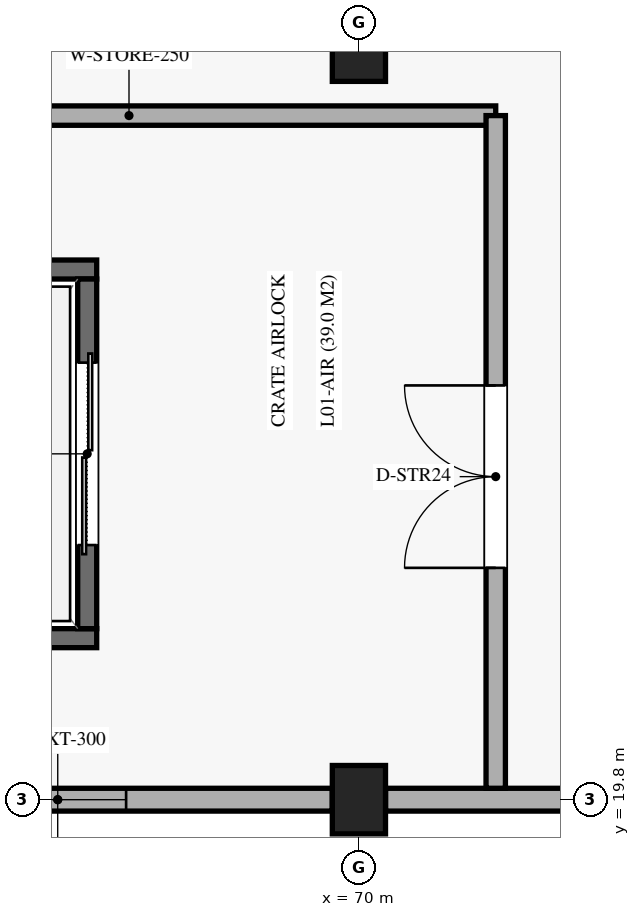
"""IFC4 building model, lengths in metres.
Left out: names, types, materials, properties, quantities, classifications, styles, units other than length and angle.
Written with IfcOpenShell. Run it as: python <this file> out.ifc"""

import sys

from ifc_helpers import new_model, si_unit, direction, frame, frame_2d, origin, origin_2d, place, context, subcontext, project, spatial, rectangle, extrude, element, fill, save


model = new_model("IFC4")
c1 = context("Model", 3, precision=1e-05, world=origin(), true_north=direction((0.0, 1.0)))
c2 = subcontext(c1, "Body", "Model", "MODEL_VIEW")
j1 = project(units=[si_unit("LENGTHUNIT", "METRE"), si_unit("PLANEANGLEUNIT", "RADIAN")], contexts=[c1])
p1 = place(None, origin())
s1 = spatial("IfcSite", under=j1, at=p1, CompositionType="ELEMENT")
p2 = place(p1, origin())
s2 = spatial("IfcBuilding", under=s1, at=p2, CompositionType="ELEMENT")
p3 = place(p2, frame((0.0, 0.0, 5.44)))
s3 = spatial("IfcBuildingStorey", under=s2, at=p3, CompositionType="ELEMENT", Elevation=5.44)
for number, where, z_axis, x_axis in (
    (1, (70.0, 19.8, 0.0), (0.0, 0.0, 1.0), (1.0, 0.0, 0.0)),
    (2, (70.0, 29.7, 0.0), (0.0, 0.0, 1.0), (1.0, 0.0, 0.0)),
):
    element("IfcColumn", number, at=place(p3, frame(where, z_axis=z_axis, x_axis=x_axis)), inside=s3, PredefinedType="COLUMN", context=c2, shape_type="SweptSolid", body=[
        extrude(rectangle(XDim=0.7, YDim=0.9, at=origin_2d()), origin(), (0.0, 0.0, 1.0), 5.44),
    ])
p4 = place(p3, frame((62.425, 19.8, 0.0), z_axis=(0.0, 0.0, 1.0), x_axis=(1.0, 0.0, 0.0)))
e3 = element("IfcWall", 3, at=p4, inside=s3, PredefinedType="SOLIDWALL", context=c2, shape_type="SweptSolid", body=[
    extrude(rectangle(XDim=7.225, YDim=0.3, at=frame_2d((3.612, 0.0))), origin(), (0.0, 0.0, 1.0), 4.4),
])
p5 = place(p4, frame((2.712, 0.0, 1.05)))
e4 = element("IfcOpeningElement", 4, at=p5, cuts=e3, PredefinedType="OPENING", context=c2, shape_type="SweptSolid", body=[
    extrude(rectangle(XDim=1.8, YDim=1.7, at=frame_2d((0.9, 0.85))), frame((0.0, 0.16, 0.0), z_axis=(0.0, -1.0, 0.0), x_axis=(1.0, 0.0, 0.0)), (0.0, 0.0, 1.0), 0.32),
])
p6 = place(p3, frame((70.35, 19.8, 0.0), z_axis=(0.0, 0.0, 1.0), x_axis=(1.0, 0.0, 0.0)))
e5 = element("IfcWall", 5, at=p6, inside=s3, PredefinedType="SOLIDWALL", context=c2, shape_type="SweptSolid", body=[
    extrude(rectangle(XDim=6.3, YDim=0.3, at=frame_2d((3.15, 0.0))), origin(), (0.0, 0.0, 1.0), 4.4),
])
p7 = place(p6, frame((2.35, 0.0, 1.05)))
e6 = element("IfcOpeningElement", 6, at=p7, cuts=e5, PredefinedType="OPENING", context=c2, shape_type="SweptSolid", body=[
    extrude(rectangle(XDim=1.6, YDim=1.65, at=frame_2d((0.8, 0.825))), frame((0.0, 0.16, 0.0), z_axis=(0.0, -1.0, 0.0), x_axis=(1.0, 0.0, 0.0)), (0.0, 0.0, 1.0), 0.32),
])
for number, where, z_axis, x_axis in (
    (7, (62.65, 21.925, 0.0), (0.0, 0.0, 1.0), (1.0, 0.0, 0.0)),
    (8, (62.65, 26.775, 0.0), (0.0, 0.0, 1.0), (1.0, 0.0, 0.0)),
):
    element("IfcWall", number, at=place(p3, frame(where, z_axis=z_axis, x_axis=x_axis)), inside=s3, PredefinedType="SOLIDWALL", context=c2, shape_type="SweptSolid", body=[
        extrude(rectangle(XDim=3.9, YDim=0.25, at=frame_2d((1.95, 0.0))), origin(), (0.0, 0.0, 1.0), 5.16),
    ])
p8 = place(p3, frame((66.425, 22.05, 0.0), z_axis=(0.0, 0.0, 1.0), x_axis=(0.0, 1.0, 0.0)))
e9 = element("IfcWall", 9, at=p8, inside=s3, PredefinedType="SOLIDWALL", context=c2, shape_type="SweptSolid", body=[
    extrude(rectangle(XDim=4.6, YDim=0.25, at=frame_2d((2.3, 0.0))), origin(), (0.0, 0.0, 1.0), 5.16),
])
p9 = place(p8, frame((1.1, 0.0, 0.0)))
e10 = element("IfcOpeningElement", 10, at=p9, cuts=e9, PredefinedType="OPENING", context=c2, shape_type="SweptSolid", body=[
    extrude(rectangle(XDim=2.4, YDim=2.65, at=frame_2d((1.2, 1.325))), frame((0.0, 0.135, 0.0), z_axis=(0.0, -1.0, 0.0), x_axis=(1.0, 0.0, 0.0)), (0.0, 0.0, 1.0), 0.27),
])
p10 = place(p3, frame((62.15, 28.8, 0.0), z_axis=(0.0, 0.0, 1.0), x_axis=(1.0, 0.0, 0.0)))
e11 = element("IfcWall", 11, at=p10, inside=s3, PredefinedType="SOLIDWALL", context=c2, shape_type="SweptSolid", body=[
    extrude(rectangle(XDim=9.65, YDim=0.255, at=frame_2d((4.825, 0.0))), origin(), (0.0, 0.0, 1.0), 4.3),
])
p11 = place(p3, frame((71.8, 19.95, 0.0), z_axis=(0.0, 0.0, 1.0), x_axis=(0.0, 1.0, 0.0)))
e12 = element("IfcWall", 12, at=p11, inside=s3, PredefinedType="SOLIDWALL", context=c2, shape_type="SweptSolid", body=[
    extrude(rectangle(XDim=8.85, YDim=0.255, at=frame_2d((4.425, 0.0))), origin(), (0.0, 0.0, 1.0), 4.3),
])
p12 = place(p11, frame((2.9, 0.0, 0.0)))
e13 = element("IfcOpeningElement", 13, at=p12, cuts=e12, PredefinedType="OPENING", context=c2, shape_type="SweptSolid", body=[
    extrude(rectangle(XDim=2.4, YDim=2.5, at=frame_2d((1.2, 1.25))), frame((0.0, 0.137, 0.0), z_axis=(0.0, -1.0, 0.0), x_axis=(1.0, 0.0, 0.0)), (0.0, 0.0, 1.0), 0.275),
])
p13 = place(p5, origin())
e14 = element("IfcWindow", 14, at=p13, inside=s3, PartitioningType="SINGLE_PANEL", PredefinedType="WINDOW", context=c2, shape_type="SweptSolid", body=[
    extrude(rectangle(XDim=1.8, YDim=1.7, at=frame_2d((0.9, 0.85))), frame((0.0, 0.03, 0.0), z_axis=(0.0, -1.0, 0.0), x_axis=(1.0, 0.0, 0.0)), (0.0, 0.0, 1.0), 0.06),
])
fill(e4, e14)
p14 = place(p9, origin())
e15 = element("IfcDoor", 15, at=p14, inside=s3, OperationType="DOUBLE_DOOR_SLIDING", PredefinedType="DOOR", context=c2, shape_type="SweptSolid", body=[
    extrude(rectangle(XDim=2.4, YDim=2.65, at=frame_2d((1.2, 1.325))), frame((0.0, 0.025, 0.0), z_axis=(0.0, -1.0, 0.0), x_axis=(1.0, 0.0, 0.0)), (0.0, 0.0, 1.0), 0.05),
])
fill(e10, e15)
p15 = place(p12, origin())
e16 = element("IfcDoor", 16, at=p15, inside=s3, OperationType="DOUBLE_DOOR_SINGLE_SWING", PredefinedType="DOOR", context=c2, shape_type="SweptSolid", body=[
    extrude(rectangle(XDim=2.4, YDim=2.5, at=frame_2d((1.2, 1.25))), frame((0.0, 0.025, 0.0), z_axis=(0.0, -1.0, 0.0), x_axis=(1.0, 0.0, 0.0)), (0.0, 0.0, 1.0), 0.05),
])
fill(e13, e16)
save(model, sys.argv[1])
